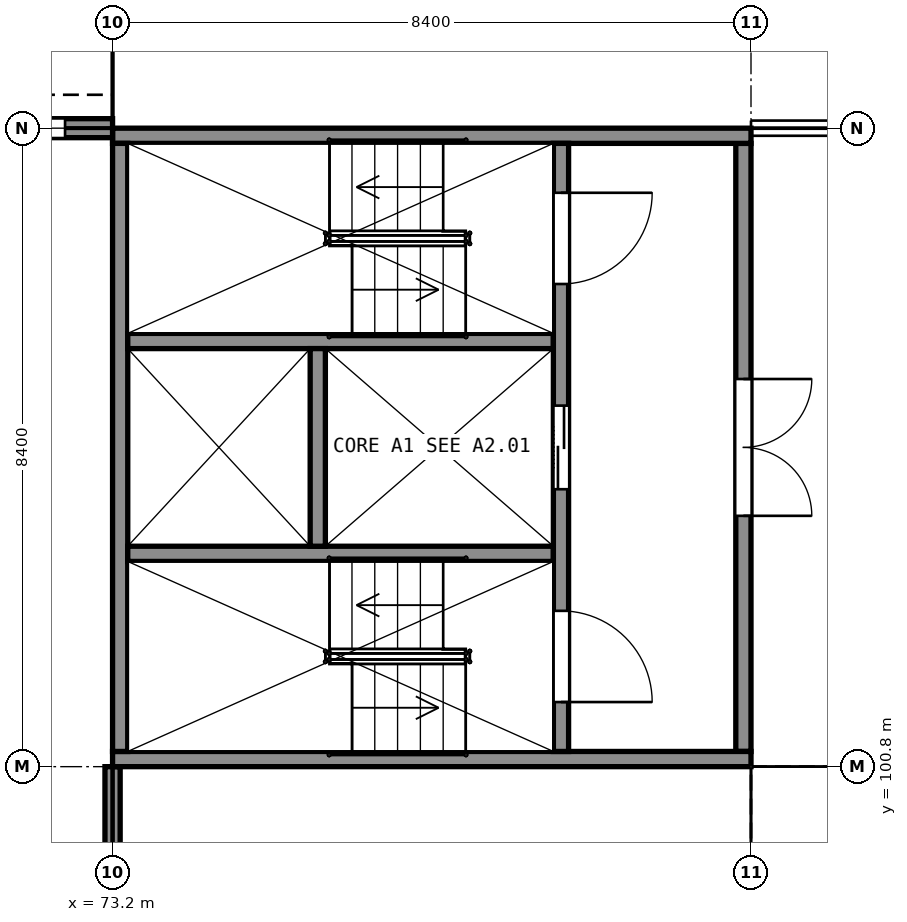
"""IFC4 building model, lengths in metres.
Left out: names, types, materials, properties, quantities, classifications, styles, units other than length and angle.
Written with IfcOpenShell. Run it as: python <this file> out.ifc"""

import sys

from ifc_helpers import new_model, si_unit, direction, frame, frame_2d, origin, place, context, subcontext, project, spatial, rectangle, extrude, element, fill, save


model = new_model("IFC4")
c1 = context("Model", 3, precision=1e-05, world=origin(), true_north=direction((0.0, 1.0)))
c2 = subcontext(c1, "Body", "Model", "MODEL_VIEW")
j1 = project(units=[si_unit("LENGTHUNIT", "METRE"), si_unit("PLANEANGLEUNIT", "RADIAN")], contexts=[c1])
p1 = place(None, origin())
s1 = spatial("IfcSite", under=j1, at=p1, CompositionType="ELEMENT")
p2 = place(p1, origin())
s2 = spatial("IfcBuilding", under=s1, at=p2, CompositionType="ELEMENT")
p3 = place(p2, frame((0.0, 0.0, 20.0)))
s3 = spatial("IfcBuildingStorey", under=s2, at=p3, CompositionType="ELEMENT", Elevation=20.0)
for number, where, z_axis, x_axis in (
    (1, (73.2, 100.9, 0.0), (0.0, 0.0, 1.0), (1.0, 0.0, 0.0)),
    (2, (73.2, 109.1, 0.0), (0.0, 0.0, 1.0), (1.0, 0.0, 0.0)),
):
    element("IfcWall", number, at=place(p3, frame(where, z_axis=z_axis, x_axis=x_axis)), inside=s3, PredefinedType="SHEAR", context=c2, shape_type="SweptSolid", body=[
        extrude(rectangle(XDim=8.4, YDim=0.2, at=frame_2d((4.2, 0.0))), origin(), (0.0, 0.0, 1.0), 5.0),
    ])
p4 = place(p3, frame((73.3, 101.0, 0.0), z_axis=(0.0, 0.0, 1.0), x_axis=(0.0, 1.0, 0.0)))
e3 = element("IfcWall", 3, at=p4, inside=s3, PredefinedType="SHEAR", context=c2, shape_type="SweptSolid", body=[
    extrude(rectangle(XDim=8.0, YDim=0.2, at=frame_2d((4.0, 0.0))), origin(), (0.0, 0.0, 1.0), 5.0),
])
p5 = place(p3, frame((81.5, 101.0, 0.0), z_axis=(0.0, 0.0, 1.0), x_axis=(0.0, 1.0, 0.0)))
e4 = element("IfcWall", 4, at=p5, inside=s3, PredefinedType="SHEAR", context=c2, shape_type="SweptSolid", body=[
    extrude(rectangle(XDim=8.0, YDim=0.2, at=frame_2d((4.0, 0.0))), origin(), (0.0, 0.0, 1.0), 5.0),
])
p6 = place(p5, frame((3.1, 0.0, 0.0)))
e5 = element("IfcOpeningElement", 5, at=p6, cuts=e4, PredefinedType="OPENING", context=c2, shape_type="SweptSolid", body=[
    extrude(rectangle(XDim=1.8, YDim=2.1, at=frame_2d((0.9, 1.05))), frame((0.0, 0.11, 0.0), z_axis=(0.0, -1.0, 0.0), x_axis=(1.0, 0.0, 0.0)), (0.0, 0.0, 1.0), 0.22),
])
p7 = place(p3, frame((79.1, 101.0, 0.0), z_axis=(0.0, 0.0, 1.0), x_axis=(0.0, 1.0, 0.0)))
e6 = element("IfcWall", 6, at=p7, inside=s3, PredefinedType="SHEAR", context=c2, shape_type="SweptSolid", body=[
    extrude(rectangle(XDim=8.0, YDim=0.2, at=frame_2d((4.0, 0.0))), origin(), (0.0, 0.0, 1.0), 5.0),
])
p8 = place(p7, frame((0.65, 0.0, 0.0)))
e7 = element("IfcOpeningElement", 7, at=p8, cuts=e6, PredefinedType="OPENING", context=c2, shape_type="SweptSolid", body=[
    extrude(rectangle(XDim=1.2, YDim=2.1, at=frame_2d((0.6, 1.05))), frame((0.0, 0.11, 0.0), z_axis=(0.0, -1.0, 0.0), x_axis=(1.0, 0.0, 0.0)), (0.0, 0.0, 1.0), 0.22),
])
p9 = place(p7, frame((6.15, 0.0, 0.0)))
e8 = element("IfcOpeningElement", 8, at=p9, cuts=e6, PredefinedType="OPENING", context=c2, shape_type="SweptSolid", body=[
    extrude(rectangle(XDim=1.2, YDim=2.1, at=frame_2d((0.6, 1.05))), frame((0.0, 0.11, 0.0), z_axis=(0.0, -1.0, 0.0), x_axis=(1.0, 0.0, 0.0)), (0.0, 0.0, 1.0), 0.22),
])
p10 = place(p7, frame((3.45, 0.0, 0.0)))
e9 = element("IfcOpeningElement", 9, at=p10, cuts=e6, PredefinedType="OPENING", context=c2, shape_type="SweptSolid", body=[
    extrude(rectangle(XDim=1.1, YDim=2.1, at=frame_2d((0.55, 1.05))), frame((0.0, 0.11, 0.0), z_axis=(0.0, -1.0, 0.0), x_axis=(1.0, 0.0, 0.0)), (0.0, 0.0, 1.0), 0.22),
])
for number, where, z_axis, x_axis in (
    (10, (73.4, 103.6, 0.0), (0.0, 0.0, 1.0), (1.0, 0.0, 0.0)),
    (11, (73.4, 106.4, 0.0), (0.0, 0.0, 1.0), (1.0, 0.0, 0.0)),
):
    element("IfcWall", number, at=place(p3, frame(where, z_axis=z_axis, x_axis=x_axis)), inside=s3, PredefinedType="SHEAR", context=c2, shape_type="SweptSolid", body=[
        extrude(rectangle(XDim=5.6, YDim=0.2, at=frame_2d((2.8, 0.0))), origin(), (0.0, 0.0, 1.0), 5.0),
    ])
p11 = place(p3, frame((75.9, 103.7, 0.0), z_axis=(0.0, 0.0, 1.0), x_axis=(0.0, 1.0, 0.0)))
e12 = element("IfcWall", 12, at=p11, inside=s3, PredefinedType="SHEAR", context=c2, shape_type="SweptSolid", body=[
    extrude(rectangle(XDim=2.6, YDim=0.2, at=frame_2d((1.3, 0.0))), origin(), (0.0, 0.0, 1.0), 5.0),
])
p12 = place(p3, frame((65.15, 109.2, 0.0), z_axis=(0.0, 0.0, 1.0), x_axis=(1.0, 0.0, 0.0)))
e13 = element("IfcWall", 13, at=p12, inside=s3, PredefinedType="SOLIDWALL", context=c2, shape_type="SweptSolid", body=[
    extrude(rectangle(XDim=8.05, YDim=0.25, at=frame_2d((4.025, 0.0))), origin(), (0.0, 0.0, 1.0), 4.349),
])
p13 = place(p12, frame((0.625, 0.0, 0.9)))
e14 = element("IfcOpeningElement", 14, at=p13, cuts=e13, PredefinedType="OPENING", context=c2, shape_type="SweptSolid", body=[
    extrude(rectangle(XDim=1.2, YDim=2.1, at=frame_2d((0.6, 1.05))), frame((0.0, 0.135, 0.0), z_axis=(0.0, -1.0, 0.0), x_axis=(1.0, 0.0, 0.0)), (0.0, 0.0, 1.0), 0.27),
])
p14 = place(p12, frame((3.425, 0.0, 0.9)))
e15 = element("IfcOpeningElement", 15, at=p14, cuts=e13, PredefinedType="OPENING", context=c2, shape_type="SweptSolid", body=[
    extrude(rectangle(XDim=1.2, YDim=2.1, at=frame_2d((0.6, 1.05))), frame((0.0, 0.135, 0.0), z_axis=(0.0, -1.0, 0.0), x_axis=(1.0, 0.0, 0.0)), (0.0, 0.0, 1.0), 0.27),
])
p15 = place(p12, frame((6.225, 0.0, 0.9)))
e16 = element("IfcOpeningElement", 16, at=p15, cuts=e13, PredefinedType="OPENING", context=c2, shape_type="SweptSolid", body=[
    extrude(rectangle(XDim=1.2, YDim=2.1, at=frame_2d((0.6, 1.05))), frame((0.0, 0.135, 0.0), z_axis=(0.0, -1.0, 0.0), x_axis=(1.0, 0.0, 0.0)), (0.0, 0.0, 1.0), 0.27),
])
p16 = place(p3, frame((73.2, 92.4, 0.0), z_axis=(0.0, 0.0, 1.0), x_axis=(0.0, 1.0, 0.0)))
e17 = element("IfcWall", 17, at=p16, inside=s3, PredefinedType="PARTITIONING", context=c2, shape_type="SweptSolid", body=[
    extrude(rectangle(XDim=8.4, YDim=0.2, at=frame_2d((4.2, 0.0))), origin(), (0.0, 0.0, 1.0), 3.9),
])
p17 = place(p15, origin())
e18 = element("IfcWindow", 18, at=p17, inside=s3, PartitioningType="SINGLE_PANEL", PredefinedType="WINDOW", context=c2, shape_type="SweptSolid", body=[
    extrude(rectangle(XDim=1.2, YDim=2.1, at=frame_2d((0.6, 1.05))), frame((0.0, -0.045, 0.0), z_axis=(0.0, -1.0, 0.0), x_axis=(1.0, 0.0, 0.0)), (0.0, 0.0, 1.0), 0.06),
])
fill(e16, e18)
p18 = place(p6, origin())
e19 = element("IfcDoor", 19, at=p18, inside=s3, OperationType="DOUBLE_DOOR_SINGLE_SWING", PredefinedType="DOOR", context=c2, shape_type="SweptSolid", body=[
    extrude(rectangle(XDim=1.8, YDim=2.1, at=frame_2d((0.9, 1.05))), frame((0.0, 0.025, 0.0), z_axis=(0.0, -1.0, 0.0), x_axis=(1.0, 0.0, 0.0)), (0.0, 0.0, 1.0), 0.05),
])
fill(e5, e19)
p19 = place(p8, origin())
e20 = element("IfcDoor", 20, at=p19, inside=s3, OperationType="SINGLE_SWING_LEFT", PredefinedType="DOOR", context=c2, shape_type="SweptSolid", body=[
    extrude(rectangle(XDim=1.2, YDim=2.1, at=frame_2d((0.6, 1.05))), frame((0.0, 0.025, 0.0), z_axis=(0.0, -1.0, 0.0), x_axis=(1.0, 0.0, 0.0)), (0.0, 0.0, 1.0), 0.05),
])
fill(e7, e20)
p20 = place(p9, origin())
e21 = element("IfcDoor", 21, at=p20, inside=s3, OperationType="SINGLE_SWING_RIGHT", PredefinedType="DOOR", context=c2, shape_type="SweptSolid", body=[
    extrude(rectangle(XDim=1.2, YDim=2.1, at=frame_2d((0.6, 1.05))), frame((0.0, 0.025, 0.0), z_axis=(0.0, -1.0, 0.0), x_axis=(1.0, 0.0, 0.0)), (0.0, 0.0, 1.0), 0.05),
])
fill(e8, e21)
p21 = place(p10, origin())
e22 = element("IfcDoor", 22, at=p21, inside=s3, OperationType="DOUBLE_DOOR_SLIDING", PredefinedType="DOOR", context=c2, shape_type="SweptSolid", body=[
    extrude(rectangle(XDim=1.1, YDim=2.1, at=frame_2d((0.55, 1.05))), frame((0.0, 0.025, 0.0), z_axis=(0.0, -1.0, 0.0), x_axis=(1.0, 0.0, 0.0)), (0.0, 0.0, 1.0), 0.05),
])
fill(e9, e22)
save(model, sys.argv[1])
